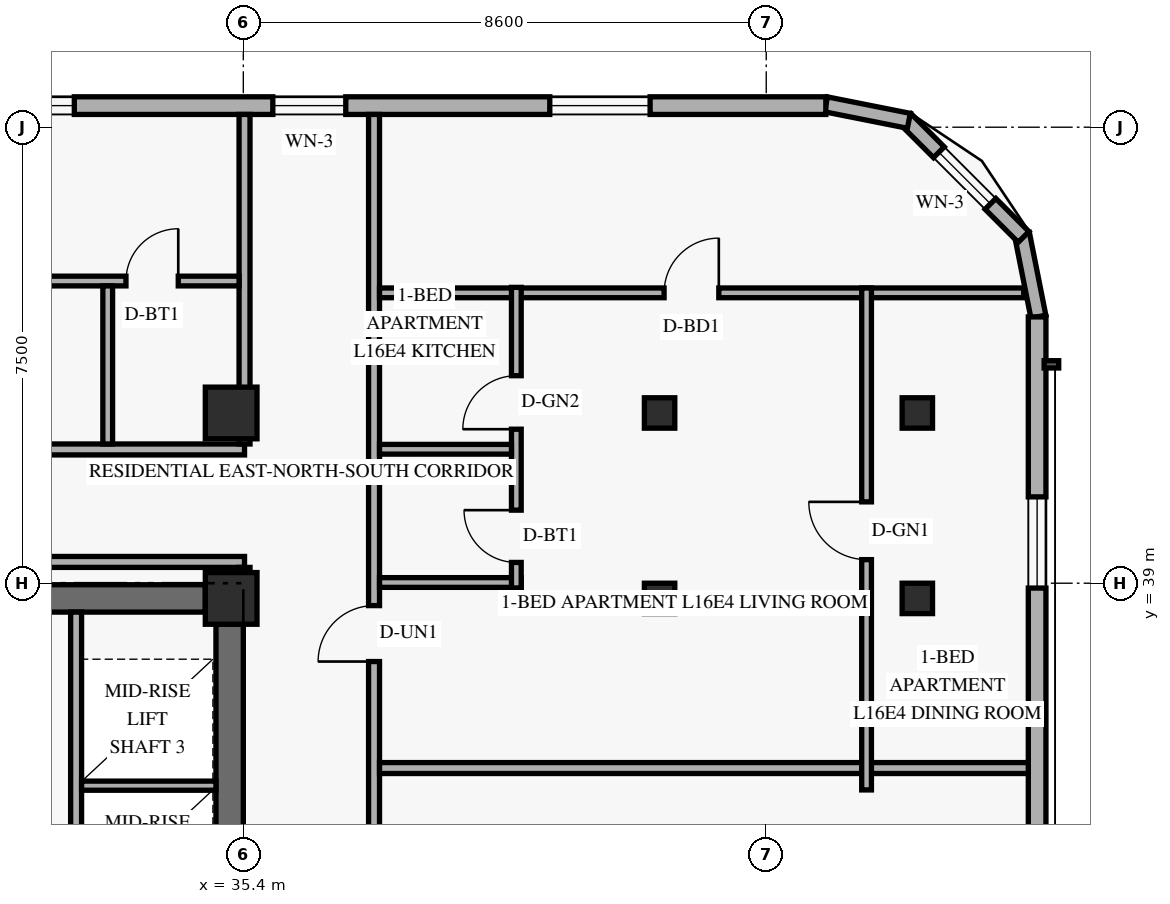
"""IFC4 building model, lengths in metres.
Left out: names, types, materials, properties, quantities, classifications, styles, units other than length and angle.
Written with IfcOpenShell. Run it as: python <this file> out.ifc"""

import sys

from ifc_helpers import new_model, si_unit, direction, frame, frame_2d, origin, origin_2d, place, context, subcontext, project, spatial, rectangle, hollow_rectangle, extrude, element, fill, save


model = new_model("IFC4")
c1 = context("Model", 3, precision=1e-05, world=origin(), true_north=direction((0.0, 1.0)))
c2 = subcontext(c1, "Body", "Model", "MODEL_VIEW")
j1 = project(units=[si_unit("LENGTHUNIT", "METRE"), si_unit("PLANEANGLEUNIT", "RADIAN")], contexts=[c1])
p1 = place(None, origin())
s1 = spatial("IfcSite", under=j1, at=p1, CompositionType="ELEMENT")
p2 = place(p1, origin())
s2 = spatial("IfcBuilding", under=s1, at=p2, CompositionType="ELEMENT")
p3 = place(p2, frame((0.0, 0.0, 64.2)))
s3 = spatial("IfcBuildingStorey", under=s2, at=p3, CompositionType="ELEMENT", Elevation=64.2)
p4 = place(p3, frame((35.175, 31.35, 0.0), z_axis=(0.0, 0.0, 1.0), x_axis=(0.0, 1.0, 0.0)))
e1 = element("IfcWall", 1, at=p4, inside=s3, PredefinedType="SHEAR", context=c2, shape_type="SweptSolid", body=[
    extrude(rectangle(XDim=6.975, YDim=0.45, at=frame_2d((3.487, 0.0))), origin(), (0.0, 0.0, 1.0), 2.667),
])
p5 = place(p3, frame((24.625, 38.75, 0.0), z_axis=(0.0, 0.0, 1.0), x_axis=(1.0, 0.0, 0.0)))
e2 = element("IfcWall", 2, at=p5, inside=s3, PredefinedType="SHEAR", context=c2, shape_type="SweptSolid", body=[
    extrude(rectangle(XDim=10.15, YDim=0.45, at=frame_2d((5.075, 0.0))), origin(), (0.0, 0.0, 1.0), 3.36),
])
for number, where, z_axis, x_axis in (
    (3, (35.2, 38.75, 0.0), (0.0, 0.0, 1.0), (1.0, 0.0, 0.0)),
    (4, (35.2, 41.8, 0.0), (0.0, 0.0, 1.0), (1.0, 0.0, 0.0)),
):
    element("IfcColumn", number, at=place(p3, frame(where, z_axis=z_axis, x_axis=x_axis)), inside=s3, PredefinedType="COLUMN", context=c2, shape_type="SweptSolid", body=[
        extrude(rectangle(XDim=0.85, YDim=0.85, at=origin_2d()), origin(), (0.0, 0.0, 1.0), 3.6),
    ])
for number, where, z_axis, x_axis in (
    (5, (42.183, 38.75, 0.0), (0.035, 0.0, 0.999), (0.0, 1.0, 0.0)),
    (6, (42.183, 41.8, 0.0), (0.035, 0.0, 0.999), (0.0, 1.0, 0.0)),
):
    element("IfcColumn", number, at=place(p3, frame(where, z_axis=z_axis, x_axis=x_axis)), inside=s3, PredefinedType="COLUMN", context=c2, shape_type="SweptSolid", body=[
        extrude(hollow_rectangle(XDim=0.5, YDim=0.5, WallThickness=0.022, at=origin_2d()), origin(), (0.0, 0.0, 1.0), 3.602),
    ])
for number, where, z_axis, x_axis in (
    (7, (46.38, 38.75, 0.0), (0.058, 0.0, 0.998), (0.0, 1.0, 0.0)),
    (8, (46.38, 41.8, 0.0), (0.058, 0.0, 0.998), (0.0, 1.0, 0.0)),
):
    element("IfcColumn", number, at=place(p3, frame(where, z_axis=z_axis, x_axis=x_axis)), inside=s3, PredefinedType="COLUMN", context=c2, shape_type="SweptSolid", body=[
        extrude(hollow_rectangle(XDim=0.5, YDim=0.5, WallThickness=0.022, at=origin_2d()), origin(), (0.0, 0.0, 1.0), 3.606),
    ])
p6 = place(p3, frame((48.476, 43.384, 0.0), z_axis=(0.0, 0.0, 1.0), x_axis=(-0.19496651342, 0.980809899341, 0.0)))
e9 = element("IfcWall", 9, at=p6, inside=s3, PredefinedType="SOLIDWALL", context=c2, shape_type="SweptSolid", body=[
    extrude(rectangle(XDim=1.389, YDim=0.25, at=frame_2d((0.694, 0.0))), origin(), (0.0, 0.0, 1.0), 3.36),
])
p7 = place(p3, frame((48.232, 44.695, 0.0), z_axis=(0.0, 0.0, 1.0), x_axis=(-0.707106781187, 0.707106781187, 0.0)))
e10 = element("IfcWall", 10, at=p7, inside=s3, PredefinedType="SOLIDWALL", context=c2, shape_type="SweptSolid", body=[
    extrude(rectangle(XDim=2.739, YDim=0.25, at=frame_2d((1.37, 0.0))), origin(), (0.0, 0.0, 1.0), 3.36),
])
p8 = place(p7, frame((0.77, 0.0, 0.85)))
e11 = element("IfcOpeningElement", 11, at=p8, cuts=e10, PredefinedType="OPENING", context=c2, shape_type="SweptSolid", body=[
    extrude(rectangle(XDim=1.2, YDim=1.5, at=frame_2d((0.6, 0.75))), frame((0.0, 0.135, 0.0), z_axis=(0.0, -1.0, 0.0), x_axis=(1.0, 0.0, 0.0)), (0.0, 0.0, 1.0), 0.27),
])
p9 = place(p3, frame((46.345, 46.605, 0.0), z_axis=(0.0, 0.0, 1.0), x_axis=(-0.980809899341, 0.19496651342, 0.0)))
e12 = element("IfcWall", 12, at=p9, inside=s3, PredefinedType="SOLIDWALL", context=c2, shape_type="SweptSolid", body=[
    extrude(rectangle(XDim=1.389, YDim=0.25, at=frame_2d((0.694, 0.0))), origin(), (0.0, 0.0, 1.0), 3.36),
])
p10 = place(p3, frame((48.455, 23.75, 0.0), z_axis=(0.0, 0.0, 1.0), x_axis=(0.0, 1.0, 0.0)))
e13 = element("IfcWall", 13, at=p10, inside=s3, PredefinedType="SOLIDWALL", context=c2, shape_type="SweptSolid", body=[
    extrude(rectangle(XDim=19.63, YDim=0.29, at=frame_2d((9.815, 0.0))), origin(), (0.0, 0.0, 1.0), 3.36),
])
p11 = place(p10, frame((2.32, 0.0, 0.85)))
e14 = element("IfcOpeningElement", 14, at=p11, cuts=e13, PredefinedType="OPENING", context=c2, shape_type="SweptSolid", body=[
    extrude(rectangle(XDim=1.5, YDim=1.55, at=frame_2d((0.75, 0.775))), frame((0.0, 0.155, 0.0), z_axis=(0.0, -1.0, 0.0), x_axis=(1.0, 0.0, 0.0)), (0.0, 0.0, 1.0), 0.31),
])
p12 = place(p10, frame((8.425, 0.0, 0.85)))
e15 = element("IfcOpeningElement", 15, at=p12, cuts=e13, PredefinedType="OPENING", context=c2, shape_type="SweptSolid", body=[
    extrude(rectangle(XDim=1.5, YDim=1.55, at=frame_2d((0.75, 0.775))), frame((0.0, 0.155, 0.0), z_axis=(0.0, -1.0, 0.0), x_axis=(1.0, 0.0, 0.0)), (0.0, 0.0, 1.0), 0.31),
])
p13 = place(p10, frame((15.17, 0.0, 0.85)))
e16 = element("IfcOpeningElement", 16, at=p13, cuts=e13, PredefinedType="OPENING", context=c2, shape_type="SweptSolid", body=[
    extrude(rectangle(XDim=1.5, YDim=1.55, at=frame_2d((0.75, 0.775))), frame((0.0, 0.155, 0.0), z_axis=(0.0, -1.0, 0.0), x_axis=(1.0, 0.0, 0.0)), (0.0, 0.0, 1.0), 0.31),
])
p14 = place(p3, frame((44.98, 46.855, 0.0), z_axis=(0.0, 0.0, 1.0), x_axis=(-1.0, 0.0, 0.0)))
e17 = element("IfcWall", 17, at=p14, inside=s3, PredefinedType="SOLIDWALL", context=c2, shape_type="SweptSolid", body=[
    extrude(rectangle(XDim=39.56, YDim=0.29, at=frame_2d((19.78, 0.0))), origin(), (0.0, 0.0, 1.0), 3.36),
])
p15 = place(p14, frame((35.295, 0.0, 0.85)))
e18 = element("IfcOpeningElement", 18, at=p15, cuts=e17, PredefinedType="OPENING", context=c2, shape_type="SweptSolid", body=[
    extrude(rectangle(XDim=1.65, YDim=1.6, at=frame_2d((0.825, 0.8))), frame((0.0, 0.155, 0.0), z_axis=(0.0, -1.0, 0.0), x_axis=(1.0, 0.0, 0.0)), (0.0, 0.0, 1.0), 0.31),
])
p16 = place(p14, frame((31.18, 0.0, 0.85)))
e19 = element("IfcOpeningElement", 19, at=p16, cuts=e17, PredefinedType="OPENING", context=c2, shape_type="SweptSolid", body=[
    extrude(rectangle(XDim=1.2, YDim=1.5, at=frame_2d((0.6, 0.75))), frame((0.0, 0.155, 0.0), z_axis=(0.0, -1.0, 0.0), x_axis=(1.0, 0.0, 0.0)), (0.0, 0.0, 1.0), 0.31),
])
p17 = place(p14, frame((25.684, 0.0, 0.85)))
e20 = element("IfcOpeningElement", 20, at=p17, cuts=e17, PredefinedType="OPENING", context=c2, shape_type="SweptSolid", body=[
    extrude(rectangle(XDim=1.65, YDim=1.6, at=frame_2d((0.825, 0.8))), frame((0.0, 0.155, 0.0), z_axis=(0.0, -1.0, 0.0), x_axis=(1.0, 0.0, 0.0)), (0.0, 0.0, 1.0), 0.31),
])
p18 = place(p14, frame((18.649, 0.0, 0.85)))
e21 = element("IfcOpeningElement", 21, at=p18, cuts=e17, PredefinedType="OPENING", context=c2, shape_type="SweptSolid", body=[
    extrude(rectangle(XDim=1.65, YDim=1.6, at=frame_2d((0.825, 0.8))), frame((0.0, 0.155, 0.0), z_axis=(0.0, -1.0, 0.0), x_axis=(1.0, 0.0, 0.0)), (0.0, 0.0, 1.0), 0.31),
])
p19 = place(p14, frame((12.359, 0.0, 0.85)))
e22 = element("IfcOpeningElement", 22, at=p19, cuts=e17, PredefinedType="OPENING", context=c2, shape_type="SweptSolid", body=[
    extrude(rectangle(XDim=1.65, YDim=1.6, at=frame_2d((0.825, 0.8))), frame((0.0, 0.155, 0.0), z_axis=(0.0, -1.0, 0.0), x_axis=(1.0, 0.0, 0.0)), (0.0, 0.0, 1.0), 0.31),
])
p20 = place(p14, frame((7.895, 0.0, 0.85)))
e23 = element("IfcOpeningElement", 23, at=p20, cuts=e17, PredefinedType="OPENING", context=c2, shape_type="SweptSolid", body=[
    extrude(rectangle(XDim=1.2, YDim=1.5, at=frame_2d((0.6, 0.75))), frame((0.0, 0.155, 0.0), z_axis=(0.0, -1.0, 0.0), x_axis=(1.0, 0.0, 0.0)), (0.0, 0.0, 1.0), 0.31),
])
p21 = place(p14, frame((2.89, 0.0, 0.85)))
e24 = element("IfcOpeningElement", 24, at=p21, cuts=e17, PredefinedType="OPENING", context=c2, shape_type="SweptSolid", body=[
    extrude(rectangle(XDim=1.65, YDim=1.6, at=frame_2d((0.825, 0.8))), frame((0.0, 0.155, 0.0), z_axis=(0.0, -1.0, 0.0), x_axis=(1.0, 0.0, 0.0)), (0.0, 0.0, 1.0), 0.31),
])
p22 = place(p3, frame((32.65, 31.35, 0.0), z_axis=(0.0, 0.0, 1.0), x_axis=(0.0, 1.0, 0.0)))
e25 = element("IfcWall", 25, at=p22, inside=s3, PredefinedType="STANDARD", context=c2, shape_type="SweptSolid", body=[
    extrude(rectangle(XDim=7.175, YDim=0.18, at=frame_2d((3.587, 0.0))), origin(), (0.0, 0.0, 1.0), 3.36),
])
p23 = place(p3, frame((32.74, 35.67, 0.0), z_axis=(0.0, 0.0, 1.0), x_axis=(1.0, 0.0, 0.0)))
e26 = element("IfcWall", 26, at=p23, inside=s3, PredefinedType="STANDARD", context=c2, shape_type="SweptSolid", body=[
    extrude(rectangle(XDim=2.21, YDim=0.15, at=frame_2d((1.105, 0.0))), origin(), (0.0, 0.0, 1.0), 3.36),
])
p24 = place(p3, frame((37.55, 1.29, 0.0), z_axis=(0.0, 0.0, 1.0), x_axis=(0.0, 1.0, 0.0)))
e27 = element("IfcWall", 27, at=p24, inside=s3, PredefinedType="STANDARD", context=c2, shape_type="SweptSolid", body=[
    extrude(rectangle(XDim=45.42, YDim=0.18, at=frame_2d((22.71, 0.0))), origin(), (0.0, 0.0, 1.0), 2.649),
])
p25 = place(p24, frame((4.81, 0.0, 0.0)))
e28 = element("IfcOpeningElement", 28, at=p25, cuts=e27, PredefinedType="OPENING", context=c2, shape_type="SweptSolid", body=[
    extrude(rectangle(XDim=0.92, YDim=2.15, at=frame_2d((0.46, 1.075))), frame((0.0, 0.1, 0.0), z_axis=(0.0, -1.0, 0.0), x_axis=(1.0, 0.0, 0.0)), (0.0, 0.0, 1.0), 0.2),
])
p26 = place(p24, frame((15.75, 0.0, 0.0)))
e29 = element("IfcOpeningElement", 29, at=p26, cuts=e27, PredefinedType="OPENING", context=c2, shape_type="SweptSolid", body=[
    extrude(rectangle(XDim=0.92, YDim=2.15, at=frame_2d((0.46, 1.075))), frame((0.0, 0.1, 0.0), z_axis=(0.0, -1.0, 0.0), x_axis=(1.0, 0.0, 0.0)), (0.0, 0.0, 1.0), 0.2),
])
p27 = place(p24, frame((27.71, 0.0, 0.0)))
e30 = element("IfcOpeningElement", 30, at=p27, cuts=e27, PredefinedType="OPENING", context=c2, shape_type="SweptSolid", body=[
    extrude(rectangle(XDim=0.92, YDim=2.15, at=frame_2d((0.46, 1.075))), frame((0.0, 0.1, 0.0), z_axis=(0.0, -1.0, 0.0), x_axis=(1.0, 0.0, 0.0)), (0.0, 0.0, 1.0), 0.2),
])
p28 = place(p24, frame((36.422, 0.0, 0.0)))
e31 = element("IfcOpeningElement", 31, at=p28, cuts=e27, PredefinedType="OPENING", context=c2, shape_type="SweptSolid", body=[
    extrude(rectangle(XDim=0.92, YDim=2.15, at=frame_2d((0.46, 1.075))), frame((0.0, 0.1, 0.0), z_axis=(0.0, -1.0, 0.0), x_axis=(1.0, 0.0, 0.0)), (0.0, 0.0, 1.0), 0.2),
])
p29 = place(p3, frame((14.1, 41.2, 0.0), z_axis=(0.0, 0.0, 1.0), x_axis=(1.0, 0.0, 0.0)))
e32 = element("IfcWall", 32, at=p29, inside=s3, PredefinedType="STANDARD", context=c2, shape_type="SweptSolid", body=[
    extrude(rectangle(XDim=21.32, YDim=0.18, at=frame_2d((10.66, 0.0))), origin(), (0.0, 0.0, 1.0), 2.649),
])
p30 = place(p29, frame((0.44, 0.0, 0.0)))
e33 = element("IfcOpeningElement", 33, at=p30, cuts=e32, PredefinedType="OPENING", context=c2, shape_type="SweptSolid", body=[
    extrude(rectangle(XDim=0.92, YDim=2.15, at=frame_2d((0.46, 1.075))), frame((0.0, 0.1, 0.0), z_axis=(0.0, -1.0, 0.0), x_axis=(1.0, 0.0, 0.0)), (0.0, 0.0, 1.0), 0.2),
])
p31 = place(p29, frame((10.631, 0.0, 0.0)))
e34 = element("IfcOpeningElement", 34, at=p31, cuts=e32, PredefinedType="OPENING", context=c2, shape_type="SweptSolid", body=[
    extrude(rectangle(XDim=0.95, YDim=2.15, at=frame_2d((0.475, 1.075))), frame((0.0, 0.1, 0.0), z_axis=(0.0, -1.0, 0.0), x_axis=(1.0, 0.0, 0.0)), (0.0, 0.0, 1.0), 0.2),
])
p32 = place(p29, frame((14.511, 0.0, 0.0)))
e35 = element("IfcOpeningElement", 35, at=p32, cuts=e32, PredefinedType="OPENING", context=c2, shape_type="SweptSolid", body=[
    extrude(rectangle(XDim=0.92, YDim=2.15, at=frame_2d((0.46, 1.075))), frame((0.0, 0.1, 0.0), z_axis=(0.0, -1.0, 0.0), x_axis=(1.0, 0.0, 0.0)), (0.0, 0.0, 1.0), 0.2),
])
p33 = place(p3, frame((23.75, 39.35, 0.0), z_axis=(0.0, 0.0, 1.0), x_axis=(1.0, 0.0, 0.0)))
e36 = element("IfcWall", 36, at=p33, inside=s3, PredefinedType="STANDARD", context=c2, shape_type="SweptSolid", body=[
    extrude(rectangle(XDim=11.67, YDim=0.18, at=frame_2d((5.835, 0.0))), origin(), (0.0, 0.0, 1.0), 2.649),
])
p34 = place(p3, frame((35.42, 38.75, 0.0), z_axis=(0.0, 0.0, 1.0), x_axis=(0.0, 1.0, 0.0)))
e37 = element("IfcWall", 37, at=p34, inside=s3, PredefinedType="STANDARD", context=c2, shape_type="SweptSolid", body=[
    extrude(rectangle(XDim=0.51, YDim=0.18, at=frame_2d((0.255, 0.0))), origin(), (0.0, 0.0, 1.0), 3.36),
])
p35 = place(p3, frame((35.42, 41.29, 0.0), z_axis=(0.0, 0.0, 1.0), x_axis=(0.0, 1.0, 0.0)))
e38 = element("IfcWall", 38, at=p35, inside=s3, PredefinedType="PARTITIONING", context=c2, shape_type="SweptSolid", body=[
    extrude(rectangle(XDim=5.42, YDim=0.18, at=frame_2d((2.71, 0.0))), origin(), (0.0, 0.0, 1.0), 3.36),
])
p36 = place(p3, frame((37.64, 35.96, 0.0), z_axis=(0.0, 0.0, 1.0), x_axis=(1.0, 0.0, 0.0)))
e39 = element("IfcWall", 39, at=p36, inside=s3, PredefinedType="PARTITIONING", context=c2, shape_type="SweptSolid", body=[
    extrude(rectangle(XDim=10.67, YDim=0.18, at=frame_2d((5.335, 0.0))), origin(), (0.0, 0.0, 1.0), 2.649),
])
p37 = place(p3, frame((37.64, 43.776, 0.0), z_axis=(0.0, 0.0, 1.0), x_axis=(1.0, 0.0, 0.0)))
e40 = element("IfcWall", 40, at=p37, inside=s3, PredefinedType="PARTITIONING", context=c2, shape_type="SweptSolid", body=[
    extrude(rectangle(XDim=10.595, YDim=0.16, at=frame_2d((5.297, 0.0))), origin(), (0.0, 0.0, 1.0), 3.36),
])
p38 = place(p37, frame((4.68, 0.0, 0.0)))
e41 = element("IfcOpeningElement", 41, at=p38, cuts=e40, PredefinedType="OPENING", context=c2, shape_type="SweptSolid", body=[
    extrude(rectangle(XDim=0.9, YDim=2.14, at=frame_2d((0.45, 1.07))), frame((0.0, 0.09, 0.0), z_axis=(0.0, -1.0, 0.0), x_axis=(1.0, 0.0, 0.0)), (0.0, 0.0, 1.0), 0.18),
])
p39 = place(p3, frame((37.64, 39.012, 0.0), z_axis=(0.0, 0.0, 1.0), x_axis=(1.0, 0.0, 0.0)))
e42 = element("IfcWall", 42, at=p39, inside=s3, PredefinedType="PLUMBINGWALL", context=c2, shape_type="SweptSolid", body=[
    extrude(rectangle(XDim=2.33, YDim=0.16, at=frame_2d((1.165, 0.0))), origin(), (0.0, 0.0, 1.0), 3.36),
])
p40 = place(p3, frame((39.89, 38.922, 0.0), z_axis=(0.0, 0.0, 1.0), x_axis=(0.0, 1.0, 0.0)))
e43 = element("IfcWall", 43, at=p40, inside=s3, PredefinedType="PLUMBINGWALL", context=c2, shape_type="SweptSolid", body=[
    extrude(rectangle(XDim=4.944, YDim=0.16, at=frame_2d((2.472, 0.0))), origin(), (0.0, 0.0, 1.0), 2.809),
])
p41 = place(p40, frame((0.42, 0.0, 0.0)))
e44 = element("IfcOpeningElement", 44, at=p41, cuts=e43, PredefinedType="OPENING", context=c2, shape_type="SweptSolid", body=[
    extrude(rectangle(XDim=0.86, YDim=2.12, at=frame_2d((0.43, 1.06))), frame((0.0, 0.09, 0.0), z_axis=(0.0, -1.0, 0.0), x_axis=(1.0, 0.0, 0.0)), (0.0, 0.0, 1.0), 0.18),
])
p42 = place(p40, frame((2.611, 0.0, 0.0)))
e45 = element("IfcOpeningElement", 45, at=p42, cuts=e43, PredefinedType="OPENING", context=c2, shape_type="SweptSolid", body=[
    extrude(rectangle(XDim=0.88, YDim=2.12, at=frame_2d((0.44, 1.06))), frame((0.0, 0.09, 0.0), z_axis=(0.0, -1.0, 0.0), x_axis=(1.0, 0.0, 0.0)), (0.0, 0.0, 1.0), 0.18),
])
p43 = place(p3, frame((37.64, 41.203, 0.0), z_axis=(0.0, 0.0, 1.0), x_axis=(1.0, 0.0, 0.0)))
e46 = element("IfcWall", 46, at=p43, inside=s3, PredefinedType="PLUMBINGWALL", context=c2, shape_type="SweptSolid", body=[
    extrude(rectangle(XDim=2.17, YDim=0.16, at=frame_2d((1.085, 0.0))), origin(), (0.0, 0.0, 1.0), 3.36),
])
p44 = place(p3, frame((45.65, 35.6, 0.0), z_axis=(0.0, 0.0, 1.0), x_axis=(0.0, 1.0, 0.0)))
e47 = element("IfcWall", 47, at=p44, inside=s3, PredefinedType="PARTITIONING", context=c2, shape_type="SweptSolid", body=[
    extrude(rectangle(XDim=8.256, YDim=0.16, at=frame_2d((4.128, 0.0))), origin(), (0.0, 0.0, 1.0), 2.649),
])
p45 = place(p44, frame((3.788, 0.0, 0.0)))
e48 = element("IfcOpeningElement", 48, at=p45, cuts=e47, PredefinedType="OPENING", context=c2, shape_type="SweptSolid", body=[
    extrude(rectangle(XDim=0.95, YDim=2.15, at=frame_2d((0.475, 1.075))), frame((0.0, 0.09, 0.0), z_axis=(0.0, -1.0, 0.0), x_axis=(1.0, 0.0, 0.0)), (0.0, 0.0, 1.0), 0.18),
])
p46 = place(p3, frame((30.75, 43.97, 0.0), z_axis=(0.0, 0.0, 1.0), x_axis=(1.0, 0.0, 0.0)))
e49 = element("IfcWall", 49, at=p46, inside=s3, PredefinedType="PLUMBINGWALL", context=c2, shape_type="SweptSolid", body=[
    extrude(rectangle(XDim=4.58, YDim=0.16, at=frame_2d((2.29, 0.0))), origin(), (0.0, 0.0, 1.0), 3.36),
])
p47 = place(p46, frame((0.35, 0.0, 0.0)))
e50 = element("IfcOpeningElement", 50, at=p47, cuts=e49, PredefinedType="OPENING", context=c2, shape_type="SweptSolid", body=[
    extrude(rectangle(XDim=0.88, YDim=2.12, at=frame_2d((0.44, 1.06))), frame((0.0, 0.09, 0.0), z_axis=(0.0, -1.0, 0.0), x_axis=(1.0, 0.0, 0.0)), (0.0, 0.0, 1.0), 0.18),
])
p48 = place(p46, frame((2.72, 0.0, 0.0)))
e51 = element("IfcOpeningElement", 51, at=p48, cuts=e49, PredefinedType="OPENING", context=c2, shape_type="SweptSolid", body=[
    extrude(rectangle(XDim=0.86, YDim=2.12, at=frame_2d((0.43, 1.06))), frame((0.0, 0.09, 0.0), z_axis=(0.0, -1.0, 0.0), x_axis=(1.0, 0.0, 0.0)), (0.0, 0.0, 1.0), 0.18),
])
p49 = place(p3, frame((33.17, 41.29, 0.0), z_axis=(0.0, 0.0, 1.0), x_axis=(0.0, 1.0, 0.0)))
e52 = element("IfcWall", 52, at=p49, inside=s3, PredefinedType="PLUMBINGWALL", context=c2, shape_type="SweptSolid", body=[
    extrude(rectangle(XDim=2.6, YDim=0.16, at=frame_2d((1.3, 0.0))), origin(), (0.0, 0.0, 1.0), 2.809),
])
p50 = place(p8, origin())
e53 = element("IfcWindow", 53, at=p50, inside=s3, PartitioningType="SINGLE_PANEL", PredefinedType="WINDOW", context=c2, shape_type="SweptSolid", body=[
    extrude(rectangle(XDim=1.2, YDim=1.5, at=frame_2d((0.6, 0.75))), frame((0.0, 0.03, 0.0), z_axis=(0.0, -1.0, 0.0), x_axis=(1.0, 0.0, 0.0)), (0.0, 0.0, 1.0), 0.06),
])
fill(e11, e53)
p51 = place(p13, origin())
e54 = element("IfcWindow", 54, at=p51, inside=s3, PartitioningType="SINGLE_PANEL", PredefinedType="WINDOW", context=c2, shape_type="SweptSolid", body=[
    extrude(rectangle(XDim=1.5, YDim=1.55, at=frame_2d((0.75, 0.775))), frame((0.0, 0.03, 0.0), z_axis=(0.0, -1.0, 0.0), x_axis=(1.0, 0.0, 0.0)), (0.0, 0.0, 1.0), 0.06),
])
fill(e16, e54)
p52 = place(p19, origin())
e55 = element("IfcWindow", 55, at=p52, inside=s3, PartitioningType="SINGLE_PANEL", PredefinedType="WINDOW", context=c2, shape_type="SweptSolid", body=[
    extrude(rectangle(XDim=1.65, YDim=1.6, at=frame_2d((0.825, 0.8))), frame((0.0, 0.03, 0.0), z_axis=(0.0, -1.0, 0.0), x_axis=(1.0, 0.0, 0.0)), (0.0, 0.0, 1.0), 0.06),
])
fill(e22, e55)
p53 = place(p20, origin())
e56 = element("IfcWindow", 56, at=p53, inside=s3, PartitioningType="SINGLE_PANEL", PredefinedType="WINDOW", context=c2, shape_type="SweptSolid", body=[
    extrude(rectangle(XDim=1.2, YDim=1.5, at=frame_2d((0.6, 0.75))), frame((0.0, 0.03, 0.0), z_axis=(0.0, -1.0, 0.0), x_axis=(1.0, 0.0, 0.0)), (0.0, 0.0, 1.0), 0.06),
])
fill(e23, e56)
p54 = place(p21, origin())
e57 = element("IfcWindow", 57, at=p54, inside=s3, PartitioningType="SINGLE_PANEL", PredefinedType="WINDOW", context=c2, shape_type="SweptSolid", body=[
    extrude(rectangle(XDim=1.65, YDim=1.6, at=frame_2d((0.825, 0.8))), frame((0.0, 0.03, 0.0), z_axis=(0.0, -1.0, 0.0), x_axis=(1.0, 0.0, 0.0)), (0.0, 0.0, 1.0), 0.06),
])
fill(e24, e57)
p55 = place(p45, origin())
e58 = element("IfcDoor", 58, at=p55, inside=s3, OperationType="SINGLE_SWING_RIGHT", PredefinedType="DOOR", context=c2, shape_type="SweptSolid", body=[
    extrude(rectangle(XDim=0.95, YDim=2.15, at=frame_2d((0.475, 1.075))), frame((0.0, 0.025, 0.0), z_axis=(0.0, -1.0, 0.0), x_axis=(1.0, 0.0, 0.0)), (0.0, 0.0, 1.0), 0.05),
])
fill(e48, e58)
p56 = place(p28, origin())
e59 = element("IfcDoor", 59, at=p56, inside=s3, OperationType="SINGLE_SWING_LEFT", PredefinedType="DOOR", context=c2, shape_type="SweptSolid", body=[
    extrude(rectangle(XDim=0.92, YDim=2.15, at=frame_2d((0.46, 1.075))), frame((0.0, 0.025, 0.0), z_axis=(0.0, -1.0, 0.0), x_axis=(1.0, 0.0, 0.0)), (0.0, 0.0, 1.0), 0.05),
])
fill(e31, e59)
p57 = place(p41, origin())
e60 = element("IfcDoor", 60, at=p57, inside=s3, OperationType="SINGLE_SWING_RIGHT", PredefinedType="DOOR", context=c2, shape_type="SweptSolid", body=[
    extrude(rectangle(XDim=0.86, YDim=2.12, at=frame_2d((0.43, 1.06))), frame((0.0, 0.025, 0.0), z_axis=(0.0, -1.0, 0.0), x_axis=(1.0, 0.0, 0.0)), (0.0, 0.0, 1.0), 0.05),
])
fill(e44, e60)
p58 = place(p42, origin())
e61 = element("IfcDoor", 61, at=p58, inside=s3, OperationType="SINGLE_SWING_LEFT", PredefinedType="DOOR", context=c2, shape_type="SweptSolid", body=[
    extrude(rectangle(XDim=0.88, YDim=2.12, at=frame_2d((0.44, 1.06))), frame((0.0, 0.025, 0.0), z_axis=(0.0, -1.0, 0.0), x_axis=(1.0, 0.0, 0.0)), (0.0, 0.0, 1.0), 0.05),
])
fill(e45, e61)
p59 = place(p38, origin())
e62 = element("IfcDoor", 62, at=p59, inside=s3, OperationType="SINGLE_SWING_RIGHT", PredefinedType="DOOR", context=c2, shape_type="SweptSolid", body=[
    extrude(rectangle(XDim=0.9, YDim=2.14, at=frame_2d((0.45, 1.07))), frame((0.0, 0.025, 0.0), z_axis=(0.0, -1.0, 0.0), x_axis=(1.0, 0.0, 0.0)), (0.0, 0.0, 1.0), 0.05),
])
fill(e41, e62)
p60 = place(p48, origin())
e63 = element("IfcDoor", 63, at=p60, inside=s3, OperationType="SINGLE_SWING_RIGHT", PredefinedType="DOOR", context=c2, shape_type="SweptSolid", body=[
    extrude(rectangle(XDim=0.86, YDim=2.12, at=frame_2d((0.43, 1.06))), frame((0.0, 0.025, 0.0), z_axis=(0.0, -1.0, 0.0), x_axis=(1.0, 0.0, 0.0)), (0.0, 0.0, 1.0), 0.05),
])
fill(e51, e63)
save(model, sys.argv[1])
